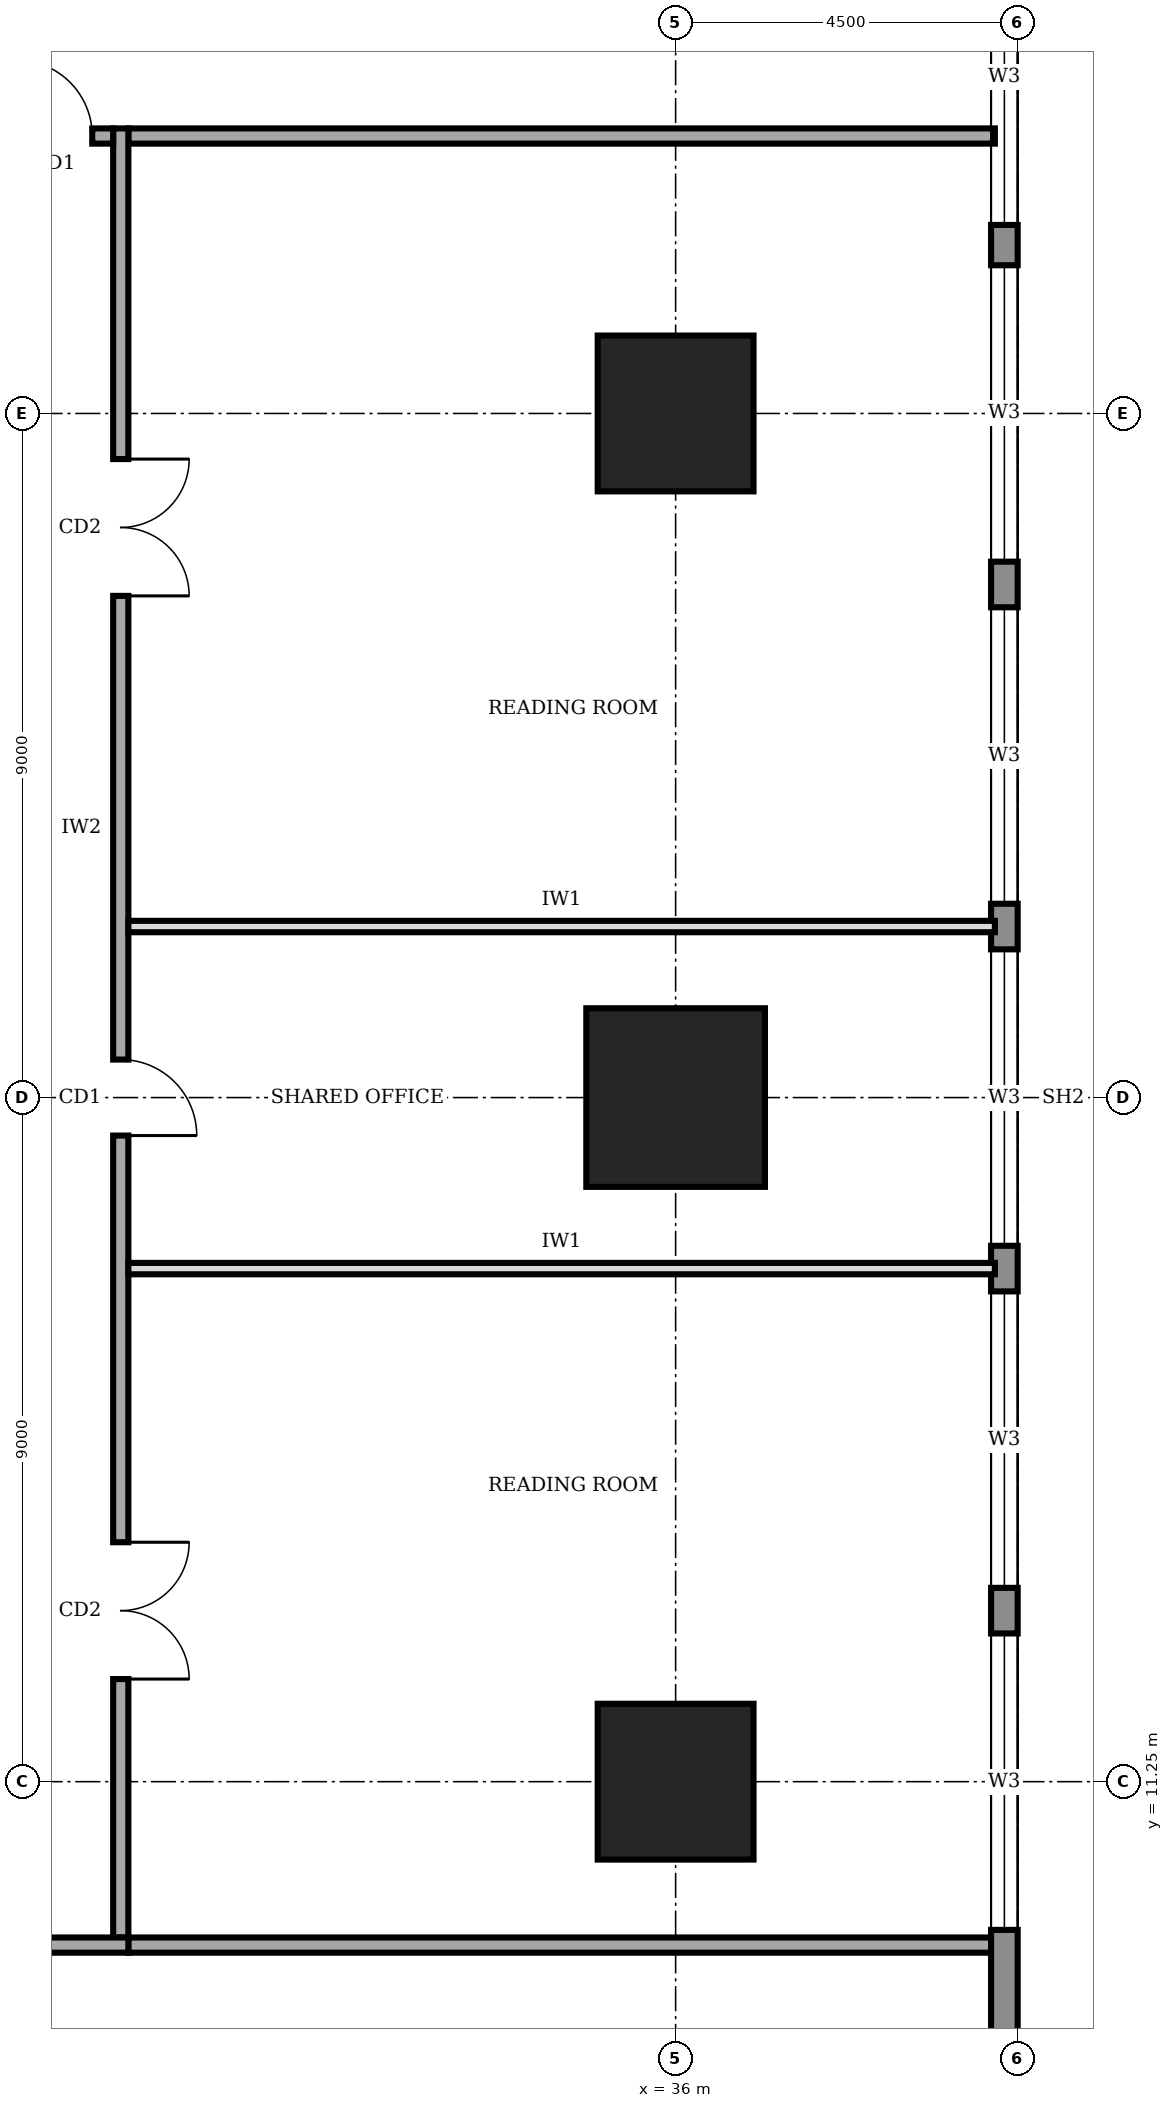
"""IFC4 building model, lengths in metres.
Left out: names, types, materials, properties, quantities, classifications, styles, units other than length and angle.
Written with IfcOpenShell. Run it as: python <this file> out.ifc"""

import sys

from ifc_helpers import new_model, si_unit, direction, frame, frame_2d, origin, origin_2d, place, context, subcontext, project, spatial, rectangle, extrude, element, fill, save


model = new_model("IFC4")
c1 = context("Model", 3, precision=1e-05, world=origin(), true_north=direction((0.0, 1.0)))
c2 = subcontext(c1, "Body", "Model", "MODEL_VIEW")
j1 = project(units=[si_unit("LENGTHUNIT", "METRE"), si_unit("PLANEANGLEUNIT", "RADIAN")], contexts=[c1])
p1 = place(None, origin())
s1 = spatial("IfcSite", under=j1, at=p1, CompositionType="ELEMENT")
p2 = place(p1, origin())
s2 = spatial("IfcBuilding", under=s1, at=p2, CompositionType="ELEMENT")
p3 = place(p2, frame((0.0, 0.0, 201.0)))
s3 = spatial("IfcBuildingStorey", under=s2, at=p3, CompositionType="ELEMENT", Elevation=201.0)
p4 = place(p3, frame((36.0, 11.25, 0.0), z_axis=(0.0, 0.0, 1.0), x_axis=(1.0, 0.0, 0.0)))
e1 = element("IfcColumn", 1, at=p4, inside=s3, PredefinedType="COLUMN", context=c2, shape_type="SweptSolid", body=[
    extrude(rectangle(XDim=2.05, YDim=2.05, at=origin_2d()), origin(), (0.0, 0.0, 1.0), 4.0),
])
p5 = place(p3, frame((36.0, 20.25, 0.0), z_axis=(0.0, 0.0, 1.0), x_axis=(1.0, 0.0, 0.0)))
e2 = element("IfcColumn", 2, at=p5, inside=s3, PredefinedType="COLUMN", context=c2, shape_type="SweptSolid", body=[
    extrude(rectangle(XDim=2.35, YDim=2.35, at=origin_2d()), origin(), (0.0, 0.0, 1.0), 4.0),
])
p6 = place(p3, frame((36.0, 29.25, 0.0), z_axis=(0.0, 0.0, 1.0), x_axis=(1.0, 0.0, 0.0)))
e3 = element("IfcColumn", 3, at=p6, inside=s3, PredefinedType="COLUMN", context=c2, shape_type="SweptSolid", body=[
    extrude(rectangle(XDim=2.05, YDim=2.05, at=origin_2d()), origin(), (0.0, 0.0, 1.0), 4.0),
])
p7 = place(p3, frame((40.325, 4.52, 0.0), z_axis=(0.0, 0.0, 1.0), x_axis=(0.0, 1.0, 0.0)))
e4 = element("IfcWall", 4, at=p7, inside=s3, PredefinedType="STANDARD", context=c2, shape_type="SweptSolid", body=[
    extrude(rectangle(XDim=31.46, YDim=0.35, at=frame_2d((15.73, 0.0))), origin(), (0.0, 0.0, 1.0), 3.75),
])
p8 = place(p7, frame((4.78, 0.0, 0.95)))
e5 = element("IfcOpeningElement", 5, at=p8, cuts=e4, PredefinedType="OPENING", context=c2, shape_type="SweptSolid", body=[
    extrude(rectangle(XDim=3.9, YDim=1.8, at=frame_2d((1.95, 0.9))), frame((0.0, 0.185, 0.0), z_axis=(0.0, -1.0, 0.0), x_axis=(1.0, 0.0, 0.0)), (0.0, 0.0, 1.0), 0.37),
])
p9 = place(p7, frame((9.28, 0.0, 0.95)))
e6 = element("IfcOpeningElement", 6, at=p9, cuts=e4, PredefinedType="OPENING", context=c2, shape_type="SweptSolid", body=[
    extrude(rectangle(XDim=3.9, YDim=1.8, at=frame_2d((1.95, 0.9))), frame((0.0, 0.185, 0.0), z_axis=(0.0, -1.0, 0.0), x_axis=(1.0, 0.0, 0.0)), (0.0, 0.0, 1.0), 0.37),
])
p10 = place(p7, frame((13.78, 0.0, 0.95)))
e7 = element("IfcOpeningElement", 7, at=p10, cuts=e4, PredefinedType="OPENING", context=c2, shape_type="SweptSolid", body=[
    extrude(rectangle(XDim=3.9, YDim=1.8, at=frame_2d((1.95, 0.9))), frame((0.0, 0.185, 0.0), z_axis=(0.0, -1.0, 0.0), x_axis=(1.0, 0.0, 0.0)), (0.0, 0.0, 1.0), 0.37),
])
p11 = place(p7, frame((18.28, 0.0, 0.95)))
e8 = element("IfcOpeningElement", 8, at=p11, cuts=e4, PredefinedType="OPENING", context=c2, shape_type="SweptSolid", body=[
    extrude(rectangle(XDim=3.9, YDim=1.8, at=frame_2d((1.95, 0.9))), frame((0.0, 0.185, 0.0), z_axis=(0.0, -1.0, 0.0), x_axis=(1.0, 0.0, 0.0)), (0.0, 0.0, 1.0), 0.37),
])
p12 = place(p7, frame((22.78, 0.0, 0.95)))
e9 = element("IfcOpeningElement", 9, at=p12, cuts=e4, PredefinedType="OPENING", context=c2, shape_type="SweptSolid", body=[
    extrude(rectangle(XDim=3.9, YDim=1.8, at=frame_2d((1.95, 0.9))), frame((0.0, 0.185, 0.0), z_axis=(0.0, -1.0, 0.0), x_axis=(1.0, 0.0, 0.0)), (0.0, 0.0, 1.0), 0.37),
])
p13 = place(p7, frame((27.21, 0.0, 0.95)))
e10 = element("IfcOpeningElement", 10, at=p13, cuts=e4, PredefinedType="OPENING", context=c2, shape_type="SweptSolid", body=[
    extrude(rectangle(XDim=3.9, YDim=1.8, at=frame_2d((1.95, 0.9))), frame((0.0, 0.185, 0.0), z_axis=(0.0, -1.0, 0.0), x_axis=(1.0, 0.0, 0.0)), (0.0, 0.0, 1.0), 0.37),
])
p14 = place(p3, frame((11.9, 9.1, 0.0), z_axis=(0.0, 0.0, 1.0), x_axis=(1.0, 0.0, 0.0)))
e11 = element("IfcWall", 11, at=p14, inside=s3, PredefinedType="SOLIDWALL", context=c2, shape_type="SweptSolid", body=[
    extrude(rectangle(XDim=16.9, YDim=0.2, at=frame_2d((8.45, 0.0))), origin(), (0.0, 0.0, 1.0), 3.75),
])
p15 = place(p14, frame((0.275, 0.0, 0.0)))
e12 = element("IfcOpeningElement", 12, at=p15, cuts=e11, PredefinedType="OPENING", context=c2, shape_type="SweptSolid", body=[
    extrude(rectangle(XDim=1.0, YDim=2.1, at=frame_2d((0.5, 1.05))), frame((0.0, 0.11, 0.0), z_axis=(0.0, -1.0, 0.0), x_axis=(1.0, 0.0, 0.0)), (0.0, 0.0, 1.0), 0.22),
])
p16 = place(p3, frame((28.7, 9.2, 0.0), z_axis=(0.0, 0.0, 1.0), x_axis=(0.0, 1.0, 0.0)))
e13 = element("IfcWall", 13, at=p16, inside=s3, PredefinedType="SOLIDWALL", context=c2, shape_type="SweptSolid", body=[
    extrude(rectangle(XDim=23.8, YDim=0.2, at=frame_2d((11.9, 0.0))), origin(), (0.0, 0.0, 1.0), 3.75),
])
p17 = place(p16, frame((3.4, 0.0, 0.0)))
e14 = element("IfcOpeningElement", 14, at=p17, cuts=e13, PredefinedType="OPENING", context=c2, shape_type="SweptSolid", body=[
    extrude(rectangle(XDim=1.8, YDim=2.1, at=frame_2d((0.9, 1.05))), frame((0.0, 0.11, 0.0), z_axis=(0.0, -1.0, 0.0), x_axis=(1.0, 0.0, 0.0)), (0.0, 0.0, 1.0), 0.22),
])
p18 = place(p16, frame((10.55, 0.0, 0.0)))
e15 = element("IfcOpeningElement", 15, at=p18, cuts=e13, PredefinedType="OPENING", context=c2, shape_type="SweptSolid", body=[
    extrude(rectangle(XDim=1.0, YDim=2.1, at=frame_2d((0.5, 1.05))), frame((0.0, 0.11, 0.0), z_axis=(0.0, -1.0, 0.0), x_axis=(1.0, 0.0, 0.0)), (0.0, 0.0, 1.0), 0.22),
])
p19 = place(p16, frame((17.65, 0.0, 0.0)))
e16 = element("IfcOpeningElement", 16, at=p19, cuts=e13, PredefinedType="OPENING", context=c2, shape_type="SweptSolid", body=[
    extrude(rectangle(XDim=1.8, YDim=2.1, at=frame_2d((0.9, 1.05))), frame((0.0, 0.11, 0.0), z_axis=(0.0, -1.0, 0.0), x_axis=(1.0, 0.0, 0.0)), (0.0, 0.0, 1.0), 0.22),
])
p20 = place(p3, frame((28.6, 32.9, 0.0), z_axis=(0.0, 0.0, 1.0), x_axis=(-1.0, 0.0, 0.0)))
e17 = element("IfcWall", 17, at=p20, inside=s3, PredefinedType="SOLIDWALL", context=c2, shape_type="SweptSolid", body=[
    extrude(rectangle(XDim=16.9, YDim=0.2, at=frame_2d((8.45, 0.0))), origin(), (0.0, 0.0, 1.0), 3.75),
])
p21 = place(p20, frame((12.85, 0.0, 0.0)))
e18 = element("IfcOpeningElement", 18, at=p21, cuts=e17, PredefinedType="OPENING", context=c2, shape_type="SweptSolid", body=[
    extrude(rectangle(XDim=1.8, YDim=2.1, at=frame_2d((0.9, 1.05))), frame((0.0, 0.11, 0.0), z_axis=(0.0, -1.0, 0.0), x_axis=(1.0, 0.0, 0.0)), (0.0, 0.0, 1.0), 0.22),
])
p22 = place(p20, frame((5.6, 0.0, 0.0)))
e19 = element("IfcOpeningElement", 19, at=p22, cuts=e17, PredefinedType="OPENING", context=c2, shape_type="SweptSolid", body=[
    extrude(rectangle(XDim=1.0, YDim=2.1, at=frame_2d((0.5, 1.05))), frame((0.0, 0.11, 0.0), z_axis=(0.0, -1.0, 0.0), x_axis=(1.0, 0.0, 0.0)), (0.0, 0.0, 1.0), 0.22),
])
p23 = place(p20, frame((0.275, 0.0, 0.0)))
e20 = element("IfcOpeningElement", 20, at=p23, cuts=e17, PredefinedType="OPENING", context=c2, shape_type="SweptSolid", body=[
    extrude(rectangle(XDim=1.0, YDim=2.1, at=frame_2d((0.5, 1.05))), frame((0.0, 0.11, 0.0), z_axis=(0.0, -1.0, 0.0), x_axis=(1.0, 0.0, 0.0)), (0.0, 0.0, 1.0), 0.22),
])
for number, where, z_axis, x_axis in (
    (21, (28.8, 9.1, 0.0), (0.0, 0.0, 1.0), (1.0, 0.0, 0.0)),
    (22, (28.8, 32.9, 0.0), (0.0, 0.0, 1.0), (1.0, 0.0, 0.0)),
):
    element("IfcWall", number, at=place(p3, frame(where, z_axis=z_axis, x_axis=x_axis)), inside=s3, PredefinedType="SOLIDWALL", context=c2, shape_type="SweptSolid", body=[
        extrude(rectangle(XDim=11.4, YDim=0.2, at=frame_2d((5.7, 0.0))), origin(), (0.0, 0.0, 1.0), 3.75),
    ])
for number, where, z_axis, x_axis in (
    (23, (28.8, 18.0, 0.0), (0.0, 0.0, 1.0), (1.0, 0.0, 0.0)),
    (24, (28.8, 22.5, 0.0), (0.0, 0.0, 1.0), (1.0, 0.0, 0.0)),
):
    element("IfcWall", number, at=place(p3, frame(where, z_axis=z_axis, x_axis=x_axis)), inside=s3, PredefinedType="PARTITIONING", context=c2, shape_type="SweptSolid", body=[
        extrude(rectangle(XDim=11.4, YDim=0.15, at=frame_2d((5.7, 0.0))), origin(), (0.0, 0.0, 1.0), 3.75),
    ])
p24 = place(p8, origin())
e25 = element("IfcWindow", 25, at=p24, inside=s3, PartitioningType="SINGLE_PANEL", PredefinedType="WINDOW", context=c2, shape_type="SweptSolid", body=[
    extrude(rectangle(XDim=3.9, YDim=1.8, at=frame_2d((1.95, 0.9))), frame((0.0, 0.03, 0.0), z_axis=(0.0, -1.0, 0.0), x_axis=(1.0, 0.0, 0.0)), (0.0, 0.0, 1.0), 0.06),
])
fill(e5, e25)
p25 = place(p9, origin())
e26 = element("IfcWindow", 26, at=p25, inside=s3, PartitioningType="SINGLE_PANEL", PredefinedType="WINDOW", context=c2, shape_type="SweptSolid", body=[
    extrude(rectangle(XDim=3.9, YDim=1.8, at=frame_2d((1.95, 0.9))), frame((0.0, 0.03, 0.0), z_axis=(0.0, -1.0, 0.0), x_axis=(1.0, 0.0, 0.0)), (0.0, 0.0, 1.0), 0.06),
])
fill(e6, e26)
p26 = place(p10, origin())
e27 = element("IfcWindow", 27, at=p26, inside=s3, PartitioningType="SINGLE_PANEL", PredefinedType="WINDOW", context=c2, shape_type="SweptSolid", body=[
    extrude(rectangle(XDim=3.9, YDim=1.8, at=frame_2d((1.95, 0.9))), frame((0.0, 0.03, 0.0), z_axis=(0.0, -1.0, 0.0), x_axis=(1.0, 0.0, 0.0)), (0.0, 0.0, 1.0), 0.06),
])
fill(e7, e27)
p27 = place(p11, origin())
e28 = element("IfcWindow", 28, at=p27, inside=s3, PartitioningType="SINGLE_PANEL", PredefinedType="WINDOW", context=c2, shape_type="SweptSolid", body=[
    extrude(rectangle(XDim=3.9, YDim=1.8, at=frame_2d((1.95, 0.9))), frame((0.0, 0.03, 0.0), z_axis=(0.0, -1.0, 0.0), x_axis=(1.0, 0.0, 0.0)), (0.0, 0.0, 1.0), 0.06),
])
fill(e8, e28)
p28 = place(p12, origin())
e29 = element("IfcWindow", 29, at=p28, inside=s3, PartitioningType="SINGLE_PANEL", PredefinedType="WINDOW", context=c2, shape_type="SweptSolid", body=[
    extrude(rectangle(XDim=3.9, YDim=1.8, at=frame_2d((1.95, 0.9))), frame((0.0, 0.03, 0.0), z_axis=(0.0, -1.0, 0.0), x_axis=(1.0, 0.0, 0.0)), (0.0, 0.0, 1.0), 0.06),
])
fill(e9, e29)
p29 = place(p13, origin())
e30 = element("IfcWindow", 30, at=p29, inside=s3, PartitioningType="SINGLE_PANEL", PredefinedType="WINDOW", context=c2, shape_type="SweptSolid", body=[
    extrude(rectangle(XDim=3.9, YDim=1.8, at=frame_2d((1.95, 0.9))), frame((0.0, 0.03, 0.0), z_axis=(0.0, -1.0, 0.0), x_axis=(1.0, 0.0, 0.0)), (0.0, 0.0, 1.0), 0.06),
])
fill(e10, e30)
p30 = place(p17, frame((1.8, 0.0, 0.0), z_axis=(0.0, 0.0, 1.0), x_axis=(-1.0, 0.0, 0.0)))
e31 = element("IfcDoor", 31, at=p30, inside=s3, OperationType="DOUBLE_DOOR_SINGLE_SWING", PredefinedType="DOOR", context=c2, shape_type="SweptSolid", body=[
    extrude(rectangle(XDim=1.8, YDim=2.1, at=frame_2d((0.9, 1.05))), frame((0.0, 0.025, 0.0), z_axis=(0.0, -1.0, 0.0), x_axis=(1.0, 0.0, 0.0)), (0.0, 0.0, 1.0), 0.05),
])
fill(e14, e31)
p31 = place(p18, frame((1.0, 0.0, 0.0), z_axis=(0.0, 0.0, 1.0), x_axis=(-1.0, 0.0, 0.0)))
e32 = element("IfcDoor", 32, at=p31, inside=s3, OperationType="SINGLE_SWING_RIGHT", PredefinedType="DOOR", context=c2, shape_type="SweptSolid", body=[
    extrude(rectangle(XDim=1.0, YDim=2.1, at=frame_2d((0.5, 1.05))), frame((0.0, 0.025, 0.0), z_axis=(0.0, -1.0, 0.0), x_axis=(1.0, 0.0, 0.0)), (0.0, 0.0, 1.0), 0.05),
])
fill(e15, e32)
p32 = place(p19, frame((1.8, 0.0, 0.0), z_axis=(0.0, 0.0, 1.0), x_axis=(-1.0, 0.0, 0.0)))
e33 = element("IfcDoor", 33, at=p32, inside=s3, OperationType="DOUBLE_DOOR_SINGLE_SWING", PredefinedType="DOOR", context=c2, shape_type="SweptSolid", body=[
    extrude(rectangle(XDim=1.8, YDim=2.1, at=frame_2d((0.9, 1.05))), frame((0.0, 0.025, 0.0), z_axis=(0.0, -1.0, 0.0), x_axis=(1.0, 0.0, 0.0)), (0.0, 0.0, 1.0), 0.05),
])
fill(e16, e33)
p33 = place(p23, frame((1.0, 0.0, 0.0), z_axis=(0.0, 0.0, 1.0), x_axis=(-1.0, 0.0, 0.0)))
e34 = element("IfcDoor", 34, at=p33, inside=s3, OperationType="SINGLE_SWING_LEFT", PredefinedType="DOOR", context=c2, shape_type="SweptSolid", body=[
    extrude(rectangle(XDim=1.0, YDim=2.1, at=frame_2d((0.5, 1.05))), frame((0.0, 0.025, 0.0), z_axis=(0.0, -1.0, 0.0), x_axis=(1.0, 0.0, 0.0)), (0.0, 0.0, 1.0), 0.05),
])
fill(e20, e34)
save(model, sys.argv[1])
